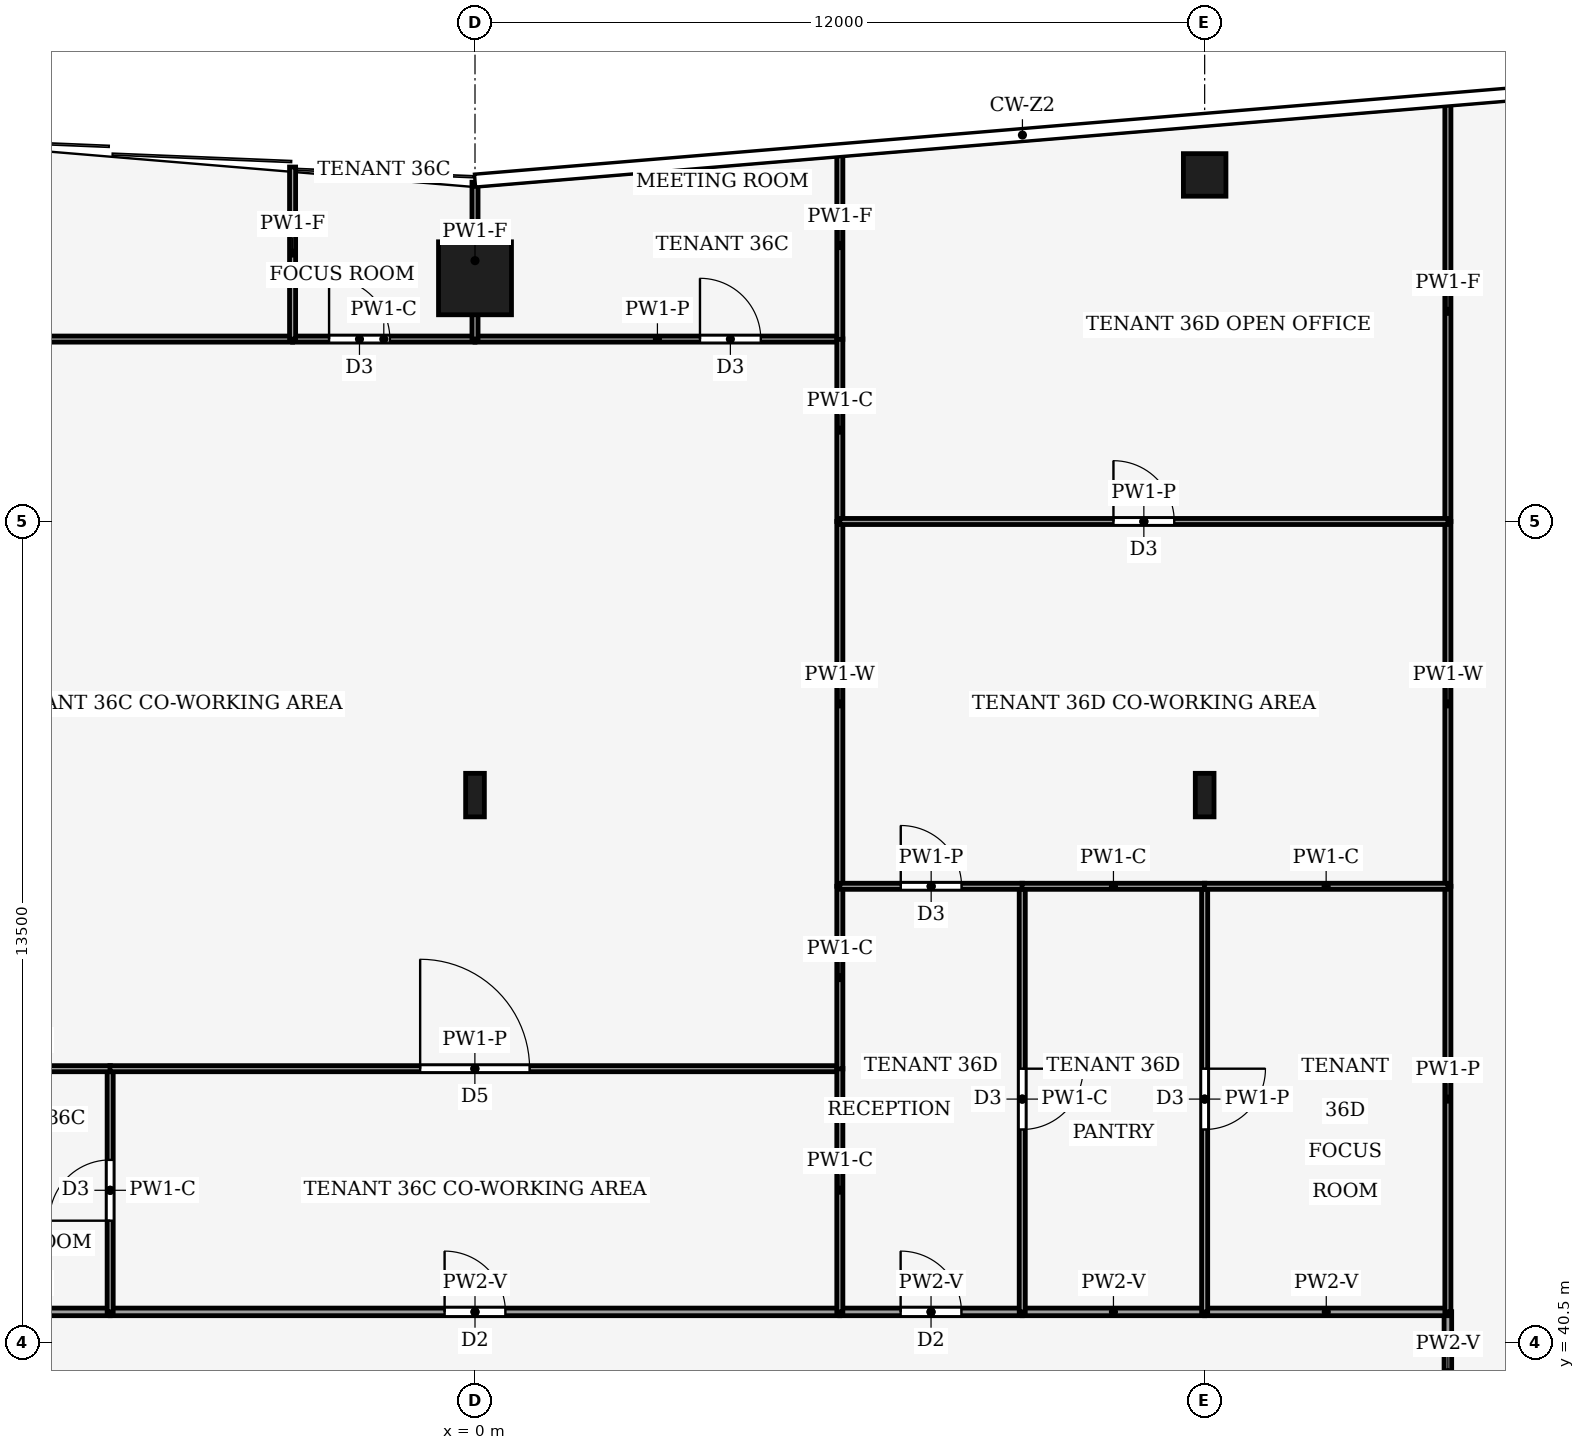
"""IFC4 building model, lengths in metres.
Left out: names, types, materials, properties, quantities, classifications, styles, units other than length and angle.
Written with IfcOpenShell. Run it as: python <this file> out.ifc"""

import sys

from ifc_helpers import new_model, si_unit, direction, frame, frame_2d, origin, origin_2d, place, context, subcontext, project, spatial, rectangle, hollow_rectangle, i_section, extrude, element, fill, save


model = new_model("IFC4")
c1 = context("Model", 3, precision=1e-05, world=origin(), true_north=direction((0.0, 1.0)))
c2 = subcontext(c1, "Body", "Model", "MODEL_VIEW")
j1 = project(units=[si_unit("LENGTHUNIT", "METRE"), si_unit("PLANEANGLEUNIT", "RADIAN")], contexts=[c1])
p1 = place(None, origin())
s1 = spatial("IfcSite", under=j1, at=p1, CompositionType="ELEMENT")
p2 = place(p1, origin())
s2 = spatial("IfcBuilding", under=s1, at=p2, CompositionType="ELEMENT")
p3 = place(p2, frame((0.0, 0.0, 158.0)))
s3 = spatial("IfcBuildingStorey", under=s2, at=p3, CompositionType="ELEMENT", Elevation=158.0)
p4 = place(p3, frame((0.0, 58.0, 0.0), z_axis=(0.0, 0.0, 1.0), x_axis=(1.0, 0.0, 0.0)))
e1 = element("IfcColumn", 1, at=p4, inside=s3, PredefinedType="COLUMN", context=c2, shape_type="SweptSolid", body=[
    extrude(hollow_rectangle(XDim=1.2, YDim=1.2, WallThickness=0.07, at=origin_2d()), origin(), (0.0, 0.0, 1.0), 4.0),
])
p5 = place(p3, frame((12.0, 59.7, 0.0), z_axis=(0.0, 0.0, 1.0), x_axis=(1.0, 0.0, 0.0)))
e2 = element("IfcColumn", 2, at=p5, inside=s3, PredefinedType="COLUMN", context=c2, shape_type="SweptSolid", body=[
    extrude(hollow_rectangle(XDim=0.7, YDim=0.7, WallThickness=0.03, at=origin_2d()), origin(), (0.0, 0.0, 1.0), 4.0),
])
for number, where, z_axis, x_axis in (
    (3, (0.0, 49.5, 0.0), (0.0, 0.0, 1.0), (1.0, 0.0, 0.0)),
    (4, (12.0, 49.5, 0.0), (0.0, 0.0, 1.0), (1.0, 0.0, 0.0)),
):
    element("IfcColumn", number, at=place(p3, frame(where, z_axis=z_axis, x_axis=x_axis)), inside=s3, PredefinedType="COLUMN", context=c2, shape_type="SweptSolid", body=[
        extrude(i_section(OverallWidth=0.308, OverallDepth=0.716, WebThickness=0.021, FlangeThickness=0.04, FilletRadius=0.027, at=origin_2d()), origin(), (0.0, 0.0, 1.0), 4.0),
    ])
p6 = place(p3, frame((16.0, 39.0, 0.0), z_axis=(0.0, 0.0, 1.0), x_axis=(0.0, 1.0, 0.0)))
e5 = element("IfcWall", 5, at=p6, inside=s3, PredefinedType="PARTITIONING", context=c2, shape_type="SweptSolid", body=[
    extrude(rectangle(XDim=2.004, YDim=0.125, at=frame_2d((1.002, 0.0))), origin(), (0.0, 0.0, 1.0), 3.44),
])
p7 = place(p3, frame((-6.0, 41.0, 0.0), z_axis=(0.0, 0.0, 1.0), x_axis=(-1.0, 0.0, 0.0)))
e6 = element("IfcWall", 6, at=p7, inside=s3, PredefinedType="PARTITIONING", context=c2, shape_type="SweptSolid", body=[
    extrude(rectangle(XDim=3.0, YDim=0.125, at=frame_2d((1.5, 0.0))), origin(), (0.0, 0.0, 1.0), 3.44),
])
p8 = place(p3, frame((-6.0, 41.0, 0.0), z_axis=(0.0, 0.0, 1.0), x_axis=(1.0, 0.0, 0.0)))
e7 = element("IfcWall", 7, at=p8, inside=s3, PredefinedType="PARTITIONING", context=c2, shape_type="SweptSolid", body=[
    extrude(rectangle(XDim=12.0, YDim=0.125, at=frame_2d((6.0, 0.0))), origin(), (0.0, 0.0, 1.0), 3.44),
])
p9 = place(p8, frame((5.5, 0.0, 0.0)))
e8 = element("IfcOpeningElement", 8, at=p9, cuts=e7, PredefinedType="OPENING", context=c2, shape_type="SweptSolid", body=[
    extrude(rectangle(XDim=1.0, YDim=2.1, at=frame_2d((0.5, 1.05))), frame((0.0, 0.073, 0.0), z_axis=(0.0, -1.0, 0.0), x_axis=(1.0, 0.0, 0.0)), (0.0, 0.0, 1.0), 0.145),
])
p10 = place(p3, frame((6.0, 41.0, 0.0), z_axis=(0.0, 0.0, 1.0), x_axis=(1.0, 0.0, 0.0)))
e9 = element("IfcWall", 9, at=p10, inside=s3, PredefinedType="PARTITIONING", context=c2, shape_type="SweptSolid", body=[
    extrude(rectangle(XDim=3.0, YDim=0.125, at=frame_2d((1.5, 0.0))), origin(), (0.0, 0.0, 1.0), 3.44),
])
p11 = place(p10, frame((1.0, 0.0, 0.0)))
e10 = element("IfcOpeningElement", 10, at=p11, cuts=e9, PredefinedType="OPENING", context=c2, shape_type="SweptSolid", body=[
    extrude(rectangle(XDim=1.0, YDim=2.1, at=frame_2d((0.5, 1.05))), frame((0.0, 0.073, 0.0), z_axis=(0.0, -1.0, 0.0), x_axis=(1.0, 0.0, 0.0)), (0.0, 0.0, 1.0), 0.145),
])
p12 = place(p3, frame((12.0, 41.0, 0.0), z_axis=(0.0, 0.0, 1.0), x_axis=(-1.0, 0.0, 0.0)))
e11 = element("IfcWall", 11, at=p12, inside=s3, PredefinedType="PARTITIONING", context=c2, shape_type="SweptSolid", body=[
    extrude(rectangle(XDim=3.0, YDim=0.125, at=frame_2d((1.5, 0.0))), origin(), (0.0, 0.0, 1.0), 3.44),
])
p13 = place(p3, frame((16.0, 41.0, 0.0), z_axis=(0.0, 0.0, 1.0), x_axis=(-1.0, 0.0, 0.0)))
e12 = element("IfcWall", 12, at=p13, inside=s3, PredefinedType="PARTITIONING", context=c2, shape_type="SweptSolid", body=[
    extrude(rectangle(XDim=4.0, YDim=0.125, at=frame_2d((2.0, 0.0))), origin(), (0.0, 0.0, 1.0), 3.44),
])
p14 = place(p3, frame((16.0, 48.0, 0.0), z_axis=(0.0, 0.0, 1.0), x_axis=(0.0, -1.0, 0.0)))
e13 = element("IfcWall", 13, at=p14, inside=s3, PredefinedType="PARTITIONING", context=c2, shape_type="SweptSolid", body=[
    extrude(rectangle(XDim=7.0, YDim=0.1, at=frame_2d((3.5, 0.0))), origin(), (0.0, 0.0, 1.0), 3.44),
])
p15 = place(p3, frame((16.0, 54.0, 0.0), z_axis=(0.0, 0.0, 1.0), x_axis=(0.0, -1.0, 0.0)))
e14 = element("IfcWall", 14, at=p15, inside=s3, PredefinedType="PARTITIONING", context=c2, shape_type="SweptSolid", body=[
    extrude(rectangle(XDim=6.0, YDim=0.1, at=frame_2d((3.0, 0.0))), origin(), (0.0, 0.0, 1.0), 3.24),
])
p16 = place(p3, frame((16.0, 60.913, 0.0), z_axis=(0.0, 0.0, 1.0), x_axis=(0.0, -1.0, 0.0)))
e15 = element("IfcWall", 15, at=p16, inside=s3, PredefinedType="PARTITIONING", context=c2, shape_type="SweptSolid", body=[
    extrude(rectangle(XDim=6.913, YDim=0.1, at=frame_2d((3.457, 0.0))), origin(), (0.0, 0.0, 1.0), 3.04),
])
p17 = place(p3, frame((-6.0, 41.0, 0.0), z_axis=(0.0, 0.0, 1.0), x_axis=(0.0, 1.0, 0.0)))
e16 = element("IfcWall", 16, at=p17, inside=s3, PredefinedType="PARTITIONING", context=c2, shape_type="SweptSolid", body=[
    extrude(rectangle(XDim=4.0, YDim=0.1, at=frame_2d((2.0, 0.0))), origin(), (0.0, 0.0, 1.0), 3.87),
])
p18 = place(p17, frame((1.5, 0.0, 0.0)))
e17 = element("IfcOpeningElement", 17, at=p18, cuts=e16, PredefinedType="OPENING", context=c2, shape_type="SweptSolid", body=[
    extrude(rectangle(XDim=1.0, YDim=2.1, at=frame_2d((0.5, 1.05))), frame((0.0, 0.06, 0.0), z_axis=(0.0, -1.0, 0.0), x_axis=(1.0, 0.0, 0.0)), (0.0, 0.0, 1.0), 0.12),
])
p19 = place(p3, frame((-5.996, 45.0, 0.0), z_axis=(0.0, 0.0, 1.0), x_axis=(-1.0, 0.0, 0.0)))
e18 = element("IfcWall", 18, at=p19, inside=s3, PredefinedType="PARTITIONING", context=c2, shape_type="SweptSolid", body=[
    extrude(rectangle(XDim=3.008, YDim=0.1, at=frame_2d((1.504, 0.0))), origin(), (0.0, 0.0, 1.0), 3.44),
])
p20 = place(p3, frame((-6.004, 45.0, 0.0), z_axis=(0.0, 0.0, 1.0), x_axis=(1.0, 0.0, 0.0)))
e19 = element("IfcWall", 19, at=p20, inside=s3, PredefinedType="PARTITIONING", context=c2, shape_type="SweptSolid", body=[
    extrude(rectangle(XDim=12.004, YDim=0.1, at=frame_2d((6.002, 0.0))), origin(), (0.0, 0.0, 1.0), 3.44),
])
p21 = place(p20, frame((5.102, 0.0, 0.0)))
e20 = element("IfcOpeningElement", 20, at=p21, cuts=e19, PredefinedType="OPENING", context=c2, shape_type="SweptSolid", body=[
    extrude(rectangle(XDim=1.8, YDim=2.1, at=frame_2d((0.9, 1.05))), frame((0.0, 0.06, 0.0), z_axis=(0.0, -1.0, 0.0), x_axis=(1.0, 0.0, 0.0)), (0.0, 0.0, 1.0), 0.12),
])
p22 = place(p3, frame((6.0, 41.0, 0.0), z_axis=(0.0, 0.0, 1.0), x_axis=(0.0, 1.0, 0.0)))
e21 = element("IfcWall", 21, at=p22, inside=s3, PredefinedType="PARTITIONING", context=c2, shape_type="SweptSolid", body=[
    extrude(rectangle(XDim=4.004, YDim=0.1, at=frame_2d((2.002, 0.0))), origin(), (0.0, 0.0, 1.0), 3.87),
])
p23 = place(p3, frame((-16.0, 57.0, 0.0), z_axis=(0.0, 0.0, 1.0), x_axis=(1.0, 0.0, 0.0)))
e22 = element("IfcWall", 22, at=p23, inside=s3, PredefinedType="PARTITIONING", context=c2, shape_type="SweptSolid", body=[
    extrude(rectangle(XDim=13.0, YDim=0.1, at=frame_2d((6.5, 0.0))), origin(), (0.0, 0.0, 1.0), 3.44),
])
p24 = place(p23, frame((6.8, 0.0, 0.0)))
e23 = element("IfcOpeningElement", 23, at=p24, cuts=e22, PredefinedType="OPENING", context=c2, shape_type="SweptSolid", body=[
    extrude(rectangle(XDim=1.0, YDim=2.1, at=frame_2d((0.5, 1.05))), frame((0.0, 0.06, 0.0), z_axis=(0.0, -1.0, 0.0), x_axis=(1.0, 0.0, 0.0)), (0.0, 0.0, 1.0), 0.12),
])
p25 = place(p3, frame((-3.0, 57.0, 0.0), z_axis=(0.0, 0.0, 1.0), x_axis=(1.0, 0.0, 0.0)))
e24 = element("IfcWall", 24, at=p25, inside=s3, PredefinedType="PARTITIONING", context=c2, shape_type="SweptSolid", body=[
    extrude(rectangle(XDim=3.0, YDim=0.1, at=frame_2d((1.5, 0.0))), origin(), (0.0, 0.0, 1.0), 3.87),
])
p26 = place(p25, frame((0.6, 0.0, 0.0)))
e25 = element("IfcOpeningElement", 25, at=p26, cuts=e24, PredefinedType="OPENING", context=c2, shape_type="SweptSolid", body=[
    extrude(rectangle(XDim=1.0, YDim=2.1, at=frame_2d((0.5, 1.05))), frame((0.0, 0.06, 0.0), z_axis=(0.0, -1.0, 0.0), x_axis=(1.0, 0.0, 0.0)), (0.0, 0.0, 1.0), 0.12),
])
p27 = place(p3, frame((0.0, 57.0, 0.0), z_axis=(0.0, 0.0, 1.0), x_axis=(1.0, 0.0, 0.0)))
e26 = element("IfcWall", 26, at=p27, inside=s3, PredefinedType="PARTITIONING", context=c2, shape_type="SweptSolid", body=[
    extrude(rectangle(XDim=6.0, YDim=0.1, at=frame_2d((3.0, 0.0))), origin(), (0.0, 0.0, 1.0), 3.44),
])
p28 = place(p27, frame((3.7, 0.0, 0.0)))
e27 = element("IfcOpeningElement", 27, at=p28, cuts=e26, PredefinedType="OPENING", context=c2, shape_type="SweptSolid", body=[
    extrude(rectangle(XDim=1.0, YDim=2.1, at=frame_2d((0.5, 1.05))), frame((0.0, 0.06, 0.0), z_axis=(0.0, -1.0, 0.0), x_axis=(1.0, 0.0, 0.0)), (0.0, 0.0, 1.0), 0.12),
])
p29 = place(p3, frame((6.0, 44.996, 0.0), z_axis=(0.0, 0.0, 1.0), x_axis=(0.0, 1.0, 0.0)))
e28 = element("IfcWall", 28, at=p29, inside=s3, PredefinedType="PARTITIONING", context=c2, shape_type="SweptSolid", body=[
    extrude(rectangle(XDim=3.004, YDim=0.1, at=frame_2d((1.502, 0.0))), origin(), (0.0, 0.0, 1.0), 3.87),
])
p30 = place(p3, frame((6.0, 48.0, 0.0), z_axis=(0.0, 0.0, 1.0), x_axis=(0.0, 1.0, 0.0)))
e29 = element("IfcWall", 29, at=p30, inside=s3, PredefinedType="PARTITIONING", context=c2, shape_type="SweptSolid", body=[
    extrude(rectangle(XDim=6.0, YDim=0.1, at=frame_2d((3.0, 0.0))), origin(), (0.0, 0.0, 1.0), 3.24),
])
p31 = place(p3, frame((6.0, 54.0, 0.0), z_axis=(0.0, 0.0, 1.0), x_axis=(0.0, 1.0, 0.0)))
e30 = element("IfcWall", 30, at=p31, inside=s3, PredefinedType="PARTITIONING", context=c2, shape_type="SweptSolid", body=[
    extrude(rectangle(XDim=3.004, YDim=0.1, at=frame_2d((1.502, 0.0))), origin(), (0.0, 0.0, 1.0), 3.87),
])
p32 = place(p3, frame((-3.0, 57.0, 0.0), z_axis=(0.0, 0.0, 1.0), x_axis=(0.0, 1.0, 0.0)))
e31 = element("IfcWall", 31, at=p32, inside=s3, PredefinedType="PARTITIONING", context=c2, shape_type="SweptSolid", body=[
    extrude(rectangle(XDim=2.83, YDim=0.1, at=frame_2d((1.415, 0.0))), origin(), (0.0, 0.0, 1.0), 3.04),
])
p33 = place(p3, frame((0.0, 57.0, 0.0), z_axis=(0.0, 0.0, 1.0), x_axis=(0.0, 1.0, 0.0)))
e32 = element("IfcWall", 32, at=p33, inside=s3, PredefinedType="PARTITIONING", context=c2, shape_type="SweptSolid", body=[
    extrude(rectangle(XDim=2.58, YDim=0.1, at=frame_2d((1.29, 0.0))), origin(), (0.0, 0.0, 1.0), 3.04),
])
p34 = place(p3, frame((6.0, 56.996, 0.0), z_axis=(0.0, 0.0, 1.0), x_axis=(0.0, 1.0, 0.0)))
e33 = element("IfcWall", 33, at=p34, inside=s3, PredefinedType="PARTITIONING", context=c2, shape_type="SweptSolid", body=[
    extrude(rectangle(XDim=3.084, YDim=0.1, at=frame_2d((1.542, 0.0))), origin(), (0.0, 0.0, 1.0), 3.04),
])
p35 = place(p3, frame((9.0, 48.0, 0.0), z_axis=(0.0, 0.0, 1.0), x_axis=(0.0, -1.0, 0.0)))
e34 = element("IfcWall", 34, at=p35, inside=s3, PredefinedType="PARTITIONING", context=c2, shape_type="SweptSolid", body=[
    extrude(rectangle(XDim=7.0, YDim=0.1, at=frame_2d((3.5, 0.0))), origin(), (0.0, 0.0, 1.0), 3.87),
])
p36 = place(p35, frame((3.0, 0.0, 0.0)))
e35 = element("IfcOpeningElement", 35, at=p36, cuts=e34, PredefinedType="OPENING", context=c2, shape_type="SweptSolid", body=[
    extrude(rectangle(XDim=1.0, YDim=2.1, at=frame_2d((0.5, 1.05))), frame((0.0, 0.06, 0.0), z_axis=(0.0, -1.0, 0.0), x_axis=(1.0, 0.0, 0.0)), (0.0, 0.0, 1.0), 0.12),
])
p37 = place(p3, frame((6.0, 48.0, 0.0), z_axis=(0.0, 0.0, 1.0), x_axis=(1.0, 0.0, 0.0)))
e36 = element("IfcWall", 36, at=p37, inside=s3, PredefinedType="PARTITIONING", context=c2, shape_type="SweptSolid", body=[
    extrude(rectangle(XDim=3.004, YDim=0.1, at=frame_2d((1.502, 0.0))), origin(), (0.0, 0.0, 1.0), 3.44),
])
p38 = place(p37, frame((1.002, 0.0, 0.0)))
e37 = element("IfcOpeningElement", 37, at=p38, cuts=e36, PredefinedType="OPENING", context=c2, shape_type="SweptSolid", body=[
    extrude(rectangle(XDim=1.0, YDim=2.1, at=frame_2d((0.5, 1.05))), frame((0.0, 0.06, 0.0), z_axis=(0.0, -1.0, 0.0), x_axis=(1.0, 0.0, 0.0)), (0.0, 0.0, 1.0), 0.12),
])
p39 = place(p3, frame((12.0, 48.0, 0.0), z_axis=(0.0, 0.0, 1.0), x_axis=(0.0, -1.0, 0.0)))
e38 = element("IfcWall", 38, at=p39, inside=s3, PredefinedType="PARTITIONING", context=c2, shape_type="SweptSolid", body=[
    extrude(rectangle(XDim=7.0, YDim=0.1, at=frame_2d((3.5, 0.0))), origin(), (0.0, 0.0, 1.0), 3.44),
])
p40 = place(p39, frame((3.0, 0.0, 0.0)))
e39 = element("IfcOpeningElement", 39, at=p40, cuts=e38, PredefinedType="OPENING", context=c2, shape_type="SweptSolid", body=[
    extrude(rectangle(XDim=1.0, YDim=2.1, at=frame_2d((0.5, 1.05))), frame((0.0, 0.06, 0.0), z_axis=(0.0, -1.0, 0.0), x_axis=(1.0, 0.0, 0.0)), (0.0, 0.0, 1.0), 0.12),
])
p41 = place(p3, frame((12.004, 48.0, 0.0), z_axis=(0.0, 0.0, 1.0), x_axis=(-1.0, 0.0, 0.0)))
e40 = element("IfcWall", 40, at=p41, inside=s3, PredefinedType="PARTITIONING", context=c2, shape_type="SweptSolid", body=[
    extrude(rectangle(XDim=3.008, YDim=0.1, at=frame_2d((1.504, 0.0))), origin(), (0.0, 0.0, 1.0), 3.87),
])
p42 = place(p3, frame((16.0, 48.0, 0.0), z_axis=(0.0, 0.0, 1.0), x_axis=(-1.0, 0.0, 0.0)))
e41 = element("IfcWall", 41, at=p42, inside=s3, PredefinedType="PARTITIONING", context=c2, shape_type="SweptSolid", body=[
    extrude(rectangle(XDim=4.004, YDim=0.1, at=frame_2d((2.002, 0.0))), origin(), (0.0, 0.0, 1.0), 3.87),
])
p43 = place(p3, frame((6.0, 54.0, 0.0), z_axis=(0.0, 0.0, 1.0), x_axis=(1.0, 0.0, 0.0)))
e42 = element("IfcWall", 42, at=p43, inside=s3, PredefinedType="PARTITIONING", context=c2, shape_type="SweptSolid", body=[
    extrude(rectangle(XDim=10.0, YDim=0.1, at=frame_2d((5.0, 0.0))), origin(), (0.0, 0.0, 1.0), 3.44),
])
p44 = place(p43, frame((4.5, 0.0, 0.0)))
e43 = element("IfcOpeningElement", 43, at=p44, cuts=e42, PredefinedType="OPENING", context=c2, shape_type="SweptSolid", body=[
    extrude(rectangle(XDim=1.0, YDim=2.1, at=frame_2d((0.5, 1.05))), frame((0.0, 0.06, 0.0), z_axis=(0.0, -1.0, 0.0), x_axis=(1.0, 0.0, 0.0)), (0.0, 0.0, 1.0), 0.12),
])
p45 = place(p9, origin())
e44 = element("IfcDoor", 44, at=p45, inside=s3, OperationType="SINGLE_SWING_RIGHT", PredefinedType="DOOR", context=c2, shape_type="SweptSolid", body=[
    extrude(rectangle(XDim=1.0, YDim=2.1, at=frame_2d((0.5, 1.05))), frame((0.0, 0.025, 0.0), z_axis=(0.0, -1.0, 0.0), x_axis=(1.0, 0.0, 0.0)), (0.0, 0.0, 1.0), 0.05),
])
fill(e8, e44)
p46 = place(p11, origin())
e45 = element("IfcDoor", 45, at=p46, inside=s3, OperationType="SINGLE_SWING_LEFT", PredefinedType="DOOR", context=c2, shape_type="SweptSolid", body=[
    extrude(rectangle(XDim=1.0, YDim=2.1, at=frame_2d((0.5, 1.05))), frame((0.0, 0.025, 0.0), z_axis=(0.0, -1.0, 0.0), x_axis=(1.0, 0.0, 0.0)), (0.0, 0.0, 1.0), 0.05),
])
fill(e10, e45)
p47 = place(p18, origin())
e46 = element("IfcDoor", 46, at=p47, inside=s3, OperationType="SINGLE_SWING_LEFT", PredefinedType="DOOR", context=c2, shape_type="SweptSolid", body=[
    extrude(rectangle(XDim=1.0, YDim=2.1, at=frame_2d((0.5, 1.05))), frame((0.0, 0.025, 0.0), z_axis=(0.0, -1.0, 0.0), x_axis=(1.0, 0.0, 0.0)), (0.0, 0.0, 1.0), 0.05),
])
fill(e17, e46)
p48 = place(p21, origin())
e47 = element("IfcDoor", 47, at=p48, inside=s3, OperationType="DOUBLE_DOOR_SINGLE_SWING", PredefinedType="DOOR", context=c2, shape_type="SweptSolid", body=[
    extrude(rectangle(XDim=1.8, YDim=2.1, at=frame_2d((0.9, 1.05))), frame((0.0, 0.025, 0.0), z_axis=(0.0, -1.0, 0.0), x_axis=(1.0, 0.0, 0.0)), (0.0, 0.0, 1.0), 0.05),
])
fill(e20, e47)
p49 = place(p26, origin())
e48 = element("IfcDoor", 48, at=p49, inside=s3, OperationType="SINGLE_SWING_LEFT", PredefinedType="DOOR", context=c2, shape_type="SweptSolid", body=[
    extrude(rectangle(XDim=1.0, YDim=2.1, at=frame_2d((0.5, 1.05))), frame((0.0, 0.025, 0.0), z_axis=(0.0, -1.0, 0.0), x_axis=(1.0, 0.0, 0.0)), (0.0, 0.0, 1.0), 0.05),
])
fill(e25, e48)
p50 = place(p28, origin())
e49 = element("IfcDoor", 49, at=p50, inside=s3, OperationType="SINGLE_SWING_RIGHT", PredefinedType="DOOR", context=c2, shape_type="SweptSolid", body=[
    extrude(rectangle(XDim=1.0, YDim=2.1, at=frame_2d((0.5, 1.05))), frame((0.0, 0.025, 0.0), z_axis=(0.0, -1.0, 0.0), x_axis=(1.0, 0.0, 0.0)), (0.0, 0.0, 1.0), 0.05),
])
fill(e27, e49)
p51 = place(p36, origin())
e50 = element("IfcDoor", 50, at=p51, inside=s3, OperationType="SINGLE_SWING_RIGHT", PredefinedType="DOOR", context=c2, shape_type="SweptSolid", body=[
    extrude(rectangle(XDim=1.0, YDim=2.1, at=frame_2d((0.5, 1.05))), frame((0.0, 0.025, 0.0), z_axis=(0.0, -1.0, 0.0), x_axis=(1.0, 0.0, 0.0)), (0.0, 0.0, 1.0), 0.05),
])
fill(e35, e50)
p52 = place(p38, origin())
e51 = element("IfcDoor", 51, at=p52, inside=s3, OperationType="SINGLE_SWING_LEFT", PredefinedType="DOOR", context=c2, shape_type="SweptSolid", body=[
    extrude(rectangle(XDim=1.0, YDim=2.1, at=frame_2d((0.5, 1.05))), frame((0.0, 0.025, 0.0), z_axis=(0.0, -1.0, 0.0), x_axis=(1.0, 0.0, 0.0)), (0.0, 0.0, 1.0), 0.05),
])
fill(e37, e51)
p53 = place(p40, origin())
e52 = element("IfcDoor", 52, at=p53, inside=s3, OperationType="SINGLE_SWING_RIGHT", PredefinedType="DOOR", context=c2, shape_type="SweptSolid", body=[
    extrude(rectangle(XDim=1.0, YDim=2.1, at=frame_2d((0.5, 1.05))), frame((0.0, 0.025, 0.0), z_axis=(0.0, -1.0, 0.0), x_axis=(1.0, 0.0, 0.0)), (0.0, 0.0, 1.0), 0.05),
])
fill(e39, e52)
p54 = place(p44, origin())
e53 = element("IfcDoor", 53, at=p54, inside=s3, OperationType="SINGLE_SWING_LEFT", PredefinedType="DOOR", context=c2, shape_type="SweptSolid", body=[
    extrude(rectangle(XDim=1.0, YDim=2.1, at=frame_2d((0.5, 1.05))), frame((0.0, 0.025, 0.0), z_axis=(0.0, -1.0, 0.0), x_axis=(1.0, 0.0, 0.0)), (0.0, 0.0, 1.0), 0.05),
])
fill(e43, e53)
save(model, sys.argv[1])
